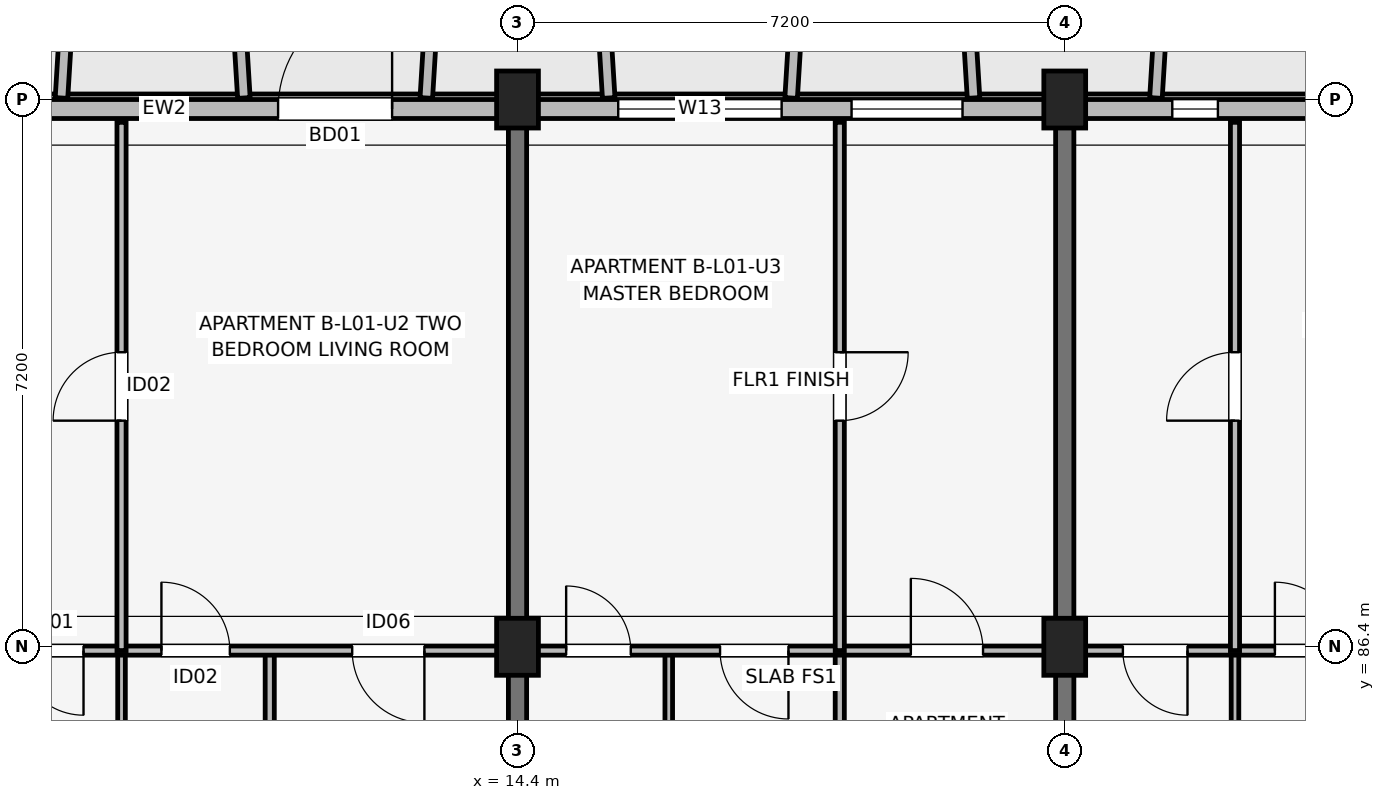
"""IFC4 building model, lengths in metres.
Left out: names, types, materials, properties, quantities, classifications, styles, units other than length and angle.
Written with IfcOpenShell. Run it as: python <this file> out.ifc"""

import sys

from ifc_helpers import new_model, si_unit, direction, frame, frame_2d, origin, origin_2d, place, context, subcontext, project, spatial, rectangle, extrude, element, fill, save


model = new_model("IFC4")
c1 = context("Model", 3, precision=1e-05, world=origin(), true_north=direction((0.0, 1.0)))
c2 = subcontext(c1, "Body", "Model", "MODEL_VIEW")
j1 = project(units=[si_unit("LENGTHUNIT", "METRE"), si_unit("PLANEANGLEUNIT", "RADIAN")], contexts=[c1])
p1 = place(None, origin())
s1 = spatial("IfcSite", under=j1, at=p1, CompositionType="ELEMENT")
p2 = place(p1, origin())
s2 = spatial("IfcBuilding", under=s1, at=p2, CompositionType="ELEMENT")
p3 = place(p2, frame((0.0, 0.0, 4.5)))
s3 = spatial("IfcBuildingStorey", under=s2, at=p3, CompositionType="ELEMENT", Elevation=4.5)
for number, where, z_axis, x_axis in (
    (1, (14.4, 86.4, 0.0), (0.0, 0.0, 1.0), (1.0, 0.0, 0.0)),
    (2, (14.4, 93.6, 0.0), (0.0, 0.0, 1.0), (1.0, 0.0, 0.0)),
    (3, (21.6, 86.4, 0.0), (0.0, 0.0, 1.0), (1.0, 0.0, 0.0)),
    (4, (21.6, 93.6, 0.0), (0.0, 0.0, 1.0), (1.0, 0.0, 0.0)),
):
    element("IfcColumn", number, at=place(p3, frame(where, z_axis=z_axis, x_axis=x_axis)), inside=s3, PredefinedType="COLUMN", context=c2, shape_type="SweptSolid", body=[
        extrude(rectangle(XDim=0.55, YDim=0.75, at=origin_2d()), origin(), (0.0, 0.0, 1.0), 4.2),
    ])
for number, where, z_axis, x_axis in (
    (5, (14.4, 83.85, 0.0), (0.0, 0.0, 1.0), (0.0, 1.0, 0.0)),
    (6, (21.6, 83.85, 0.0), (0.0, 0.0, 1.0), (0.0, 1.0, 0.0)),
):
    element("IfcWall", number, at=place(p3, frame(where, z_axis=z_axis, x_axis=x_axis)), inside=s3, PredefinedType="SHEAR", context=c2, shape_type="SweptSolid", body=[
        extrude(rectangle(XDim=9.4, YDim=0.24, at=frame_2d((4.7, 0.0))), origin(), (0.0, 0.0, 1.0), 4.2),
    ])
p4 = place(p3, frame((32.8, 93.475, 0.0), z_axis=(0.0, 0.0, 1.0), x_axis=(-1.0, 0.0, 0.0)))
e7 = element("IfcWall", 7, at=p4, inside=s3, PredefinedType="SOLIDWALL", context=c2, shape_type="SweptSolid", body=[
    extrude(rectangle(XDim=29.6, YDim=0.25, at=frame_2d((14.8, 0.0))), origin(), (0.0, 0.0, 1.0), 3.48),
])
p5 = place(p4, frame((21.55, 0.0, 0.0), z_axis=(0.0, 0.0, 1.0), x_axis=(-1.0, 0.0, 0.0)))
e8 = element("IfcOpeningElement", 8, at=p5, cuts=e7, PredefinedType="OPENING", context=c2, shape_type="SweptSolid", body=[
    extrude(rectangle(XDim=1.5, YDim=2.15, at=frame_2d((0.75, 1.075))), frame((0.0, 0.135, 0.0), z_axis=(0.0, -1.0, 0.0), x_axis=(1.0, 0.0, 0.0)), (0.0, 0.0, 1.0), 0.27),
])
p6 = place(p4, frame((7.3, 0.0, 0.0), z_axis=(0.0, 0.0, 1.0), x_axis=(-1.0, 0.0, 0.0)))
e9 = element("IfcOpeningElement", 9, at=p6, cuts=e7, PredefinedType="OPENING", context=c2, shape_type="SweptSolid", body=[
    extrude(rectangle(XDim=1.8, YDim=2.15, at=frame_2d((0.9, 1.075))), frame((0.0, 0.135, 0.0), z_axis=(0.0, -1.0, 0.0), x_axis=(1.0, 0.0, 0.0)), (0.0, 0.0, 1.0), 0.27),
])
p7 = place(p4, frame((27.57, 0.0, 0.7)))
e10 = element("IfcOpeningElement", 10, at=p7, cuts=e7, PredefinedType="OPENING", context=c2, shape_type="SweptSolid", body=[
    extrude(rectangle(XDim=1.46, YDim=1.55, at=frame_2d((0.73, 0.775))), frame((0.0, 0.135, 0.0), z_axis=(0.0, -1.0, 0.0), x_axis=(1.0, 0.0, 0.0)), (0.0, 0.0, 1.0), 0.27),
])
p8 = place(p4, frame((26.058, 0.0, 0.75)))
e11 = element("IfcOpeningElement", 11, at=p8, cuts=e7, PredefinedType="OPENING", context=c2, shape_type="SweptSolid", body=[
    extrude(rectangle(XDim=0.6, YDim=1.25, at=frame_2d((0.3, 0.625))), frame((0.0, 0.135, 0.0), z_axis=(0.0, -1.0, 0.0), x_axis=(1.0, 0.0, 0.0)), (0.0, 0.0, 1.0), 0.27),
])
p9 = place(p4, frame((24.542, 0.0, 0.75)))
e12 = element("IfcOpeningElement", 12, at=p9, cuts=e7, PredefinedType="OPENING", context=c2, shape_type="SweptSolid", body=[
    extrude(rectangle(XDim=0.6, YDim=1.25, at=frame_2d((0.3, 0.625))), frame((0.0, 0.135, 0.0), z_axis=(0.0, -1.0, 0.0), x_axis=(1.0, 0.0, 0.0)), (0.0, 0.0, 1.0), 0.27),
])
p10 = place(p4, frame((14.925, 0.0, 0.7)))
e13 = element("IfcOpeningElement", 13, at=p10, cuts=e7, PredefinedType="OPENING", context=c2, shape_type="SweptSolid", body=[
    extrude(rectangle(XDim=2.15, YDim=1.65, at=frame_2d((1.075, 0.825))), frame((0.0, 0.135, 0.0), z_axis=(0.0, -1.0, 0.0), x_axis=(1.0, 0.0, 0.0)), (0.0, 0.0, 1.0), 0.27),
])
p11 = place(p4, frame((12.545, 0.0, 0.75)))
e14 = element("IfcOpeningElement", 14, at=p11, cuts=e7, PredefinedType="OPENING", context=c2, shape_type="SweptSolid", body=[
    extrude(rectangle(XDim=1.46, YDim=1.55, at=frame_2d((0.73, 0.775))), frame((0.0, 0.135, 0.0), z_axis=(0.0, -1.0, 0.0), x_axis=(1.0, 0.0, 0.0)), (0.0, 0.0, 1.0), 0.27),
])
p12 = place(p4, frame((9.185, 0.0, 0.75)))
e15 = element("IfcOpeningElement", 15, at=p12, cuts=e7, PredefinedType="OPENING", context=c2, shape_type="SweptSolid", body=[
    extrude(rectangle(XDim=0.6, YDim=1.25, at=frame_2d((0.3, 0.625))), frame((0.0, 0.135, 0.0), z_axis=(0.0, -1.0, 0.0), x_axis=(1.0, 0.0, 0.0)), (0.0, 0.0, 1.0), 0.27),
])
p13 = place(p4, frame((2.942, 0.0, 0.75)))
e16 = element("IfcOpeningElement", 16, at=p13, cuts=e7, PredefinedType="OPENING", context=c2, shape_type="SweptSolid", body=[
    extrude(rectangle(XDim=0.6, YDim=1.25, at=frame_2d((0.3, 0.625))), frame((0.0, 0.135, 0.0), z_axis=(0.0, -1.0, 0.0), x_axis=(1.0, 0.0, 0.0)), (0.0, 0.0, 1.0), 0.27),
])
p14 = place(p4, frame((0.745, 0.0, 0.75)))
e17 = element("IfcOpeningElement", 17, at=p14, cuts=e7, PredefinedType="OPENING", context=c2, shape_type="SweptSolid", body=[
    extrude(rectangle(XDim=0.85, YDim=1.4, at=frame_2d((0.425, 0.7))), frame((0.0, 0.135, 0.0), z_axis=(0.0, -1.0, 0.0), x_axis=(1.0, 0.0, 0.0)), (0.0, 0.0, 1.0), 0.27),
])
for number, where, z_axis, x_axis in (
    (18, (8.4, 93.62, 0.0), (0.0, 0.0, 1.0), (0.061, 0.998, 0.0)),
    (19, (10.8, 93.62, 0.0), (0.0, 0.0, 1.0), (-0.061, 0.998, 0.0)),
    (20, (13.2, 93.62, 0.0), (0.0, 0.0, 1.0), (0.061, 0.998, 0.0)),
):
    element("IfcWall", number, at=place(p3, frame(where, z_axis=z_axis, x_axis=x_axis)), inside=s3, PredefinedType="ELEMENTEDWALL", context=c2, shape_type="SweptSolid", body=[
        extrude(rectangle(XDim=1.964, YDim=0.165, at=frame_2d((0.982, 0.0))), origin(), (0.0, 0.0, 1.0), 3.58),
    ])
for number, where, z_axis, x_axis in (
    (21, (15.6, 93.62, 0.0), (0.0, 0.0, 1.0), (-0.061, 0.998, 0.0)),
    (22, (18.0, 93.62, 0.0), (0.0, 0.0, 1.0), (0.061, 0.998, 0.0)),
    (23, (20.4, 93.62, 0.0), (0.0, 0.0, 1.0), (-0.061, 0.998, 0.0)),
):
    element("IfcWall", number, at=place(p3, frame(where, z_axis=z_axis, x_axis=x_axis)), inside=s3, PredefinedType="ELEMENTEDWALL", context=c2, shape_type="SweptSolid", body=[
        extrude(rectangle(XDim=1.964, YDim=0.165, at=frame_2d((0.982, 0.0))), origin(), (0.0, 0.0, 1.0), 3.6),
    ])
p15 = place(p3, frame((22.8, 93.62, 0.0), z_axis=(0.0, 0.0, 1.0), x_axis=(0.061046865508, 0.998134900808, 0.0)))
e24 = element("IfcWall", 24, at=p15, inside=s3, PredefinedType="ELEMENTEDWALL", context=c2, shape_type="SweptSolid", body=[
    extrude(rectangle(XDim=1.964, YDim=0.165, at=frame_2d((0.982, 0.0))), origin(), (0.0, 0.0, 1.0), 3.63),
])
p16 = place(p3, frame((9.19, 83.7, 0.0), z_axis=(0.0, 0.0, 1.0), x_axis=(0.0, 1.0, 0.0)))
e25 = element("IfcWall", 25, at=p16, inside=s3, PredefinedType="PARTITIONING", context=c2, shape_type="SweptSolid", body=[
    extrude(rectangle(XDim=2.65, YDim=0.1, at=frame_2d((1.325, 0.0))), origin(), (0.0, 0.0, 1.0), 3.25),
])
p17 = place(p3, frame((11.14, 83.7, 0.0), z_axis=(0.0, 0.0, 1.0), x_axis=(0.0, 1.0, 0.0)))
e26 = element("IfcWall", 26, at=p17, inside=s3, PredefinedType="PARTITIONING", context=c2, shape_type="SweptSolid", body=[
    extrude(rectangle(XDim=2.65, YDim=0.12, at=frame_2d((1.325, 0.0))), origin(), (0.0, 0.0, 1.0), 3.25),
])
p18 = place(p3, frame((7.34, 86.35, 0.0), z_axis=(0.0, 0.0, 1.0), x_axis=(1.0, 0.0, 0.0)))
e27 = element("IfcWall", 27, at=p18, inside=s3, PredefinedType="PARTITIONING", context=c2, shape_type="SweptSolid", body=[
    extrude(rectangle(XDim=6.92, YDim=0.12, at=frame_2d((3.46, 0.0))), origin(), (0.0, 0.0, 1.0), 3.25),
])
p19 = place(p18, frame((1.35, 0.0, 0.0), z_axis=(0.0, 0.0, 1.0), x_axis=(-1.0, 0.0, 0.0)))
e28 = element("IfcOpeningElement", 28, at=p19, cuts=e27, PredefinedType="OPENING", context=c2, shape_type="SweptSolid", body=[
    extrude(rectangle(XDim=0.85, YDim=2.08, at=frame_2d((0.425, 1.04))), frame((0.0, 0.07, 0.0), z_axis=(0.0, -1.0, 0.0), x_axis=(1.0, 0.0, 0.0)), (0.0, 0.0, 1.0), 0.14),
])
p20 = place(p18, frame((2.375, 0.0, 0.0)))
e29 = element("IfcOpeningElement", 29, at=p20, cuts=e27, PredefinedType="OPENING", context=c2, shape_type="SweptSolid", body=[
    extrude(rectangle(XDim=0.9, YDim=2.08, at=frame_2d((0.45, 1.04))), frame((0.0, 0.07, 0.0), z_axis=(0.0, -1.0, 0.0), x_axis=(1.0, 0.0, 0.0)), (0.0, 0.0, 1.0), 0.14),
])
p21 = place(p18, frame((5.835, 0.0, 0.0), z_axis=(0.0, 0.0, 1.0), x_axis=(-1.0, 0.0, 0.0)))
e30 = element("IfcOpeningElement", 30, at=p21, cuts=e27, PredefinedType="OPENING", context=c2, shape_type="SweptSolid", body=[
    extrude(rectangle(XDim=0.95, YDim=2.08, at=frame_2d((0.475, 1.04))), frame((0.0, 0.07, 0.0), z_axis=(0.0, -1.0, 0.0), x_axis=(1.0, 0.0, 0.0)), (0.0, 0.0, 1.0), 0.14),
])
p22 = place(p3, frame((9.19, 86.35, 0.0), z_axis=(0.0, 0.0, 1.0), x_axis=(0.0, 1.0, 0.0)))
e31 = element("IfcWall", 31, at=p22, inside=s3, PredefinedType="PARTITIONING", context=c2, shape_type="SweptSolid", body=[
    extrude(rectangle(XDim=6.95, YDim=0.12, at=frame_2d((3.475, 0.0))), origin(), (0.0, 0.0, 1.0), 3.25),
])
p23 = place(p22, frame((3.025, 0.0, 0.0)))
e32 = element("IfcOpeningElement", 32, at=p23, cuts=e31, PredefinedType="OPENING", context=c2, shape_type="SweptSolid", body=[
    extrude(rectangle(XDim=0.9, YDim=2.08, at=frame_2d((0.45, 1.04))), frame((0.0, 0.07, 0.0), z_axis=(0.0, -1.0, 0.0), x_axis=(1.0, 0.0, 0.0)), (0.0, 0.0, 1.0), 0.14),
])
p24 = place(p3, frame((16.39, 83.7, 0.0), z_axis=(0.0, 0.0, 1.0), x_axis=(0.0, 1.0, 0.0)))
e33 = element("IfcWall", 33, at=p24, inside=s3, PredefinedType="PARTITIONING", context=c2, shape_type="SweptSolid", body=[
    extrude(rectangle(XDim=2.65, YDim=0.1, at=frame_2d((1.325, 0.0))), origin(), (0.0, 0.0, 1.0), 3.25),
])
p25 = place(p3, frame((18.64, 83.7, 0.0), z_axis=(0.0, 0.0, 1.0), x_axis=(0.0, 1.0, 0.0)))
e34 = element("IfcWall", 34, at=p25, inside=s3, PredefinedType="PARTITIONING", context=c2, shape_type="SweptSolid", body=[
    extrude(rectangle(XDim=2.65, YDim=0.12, at=frame_2d((1.325, 0.0))), origin(), (0.0, 0.0, 1.0), 3.25),
])
p26 = place(p3, frame((14.54, 86.35, 0.0), z_axis=(0.0, 0.0, 1.0), x_axis=(1.0, 0.0, 0.0)))
e35 = element("IfcWall", 35, at=p26, inside=s3, PredefinedType="PARTITIONING", context=c2, shape_type="SweptSolid", body=[
    extrude(rectangle(XDim=6.92, YDim=0.12, at=frame_2d((3.46, 0.0))), origin(), (0.0, 0.0, 1.0), 3.25),
])
p27 = place(p26, frame((0.5, 0.0, 0.0)))
e36 = element("IfcOpeningElement", 36, at=p27, cuts=e35, PredefinedType="OPENING", context=c2, shape_type="SweptSolid", body=[
    extrude(rectangle(XDim=0.85, YDim=2.08, at=frame_2d((0.425, 1.04))), frame((0.0, 0.07, 0.0), z_axis=(0.0, -1.0, 0.0), x_axis=(1.0, 0.0, 0.0)), (0.0, 0.0, 1.0), 0.14),
])
p28 = place(p26, frame((3.425, 0.0, 0.0), z_axis=(0.0, 0.0, 1.0), x_axis=(-1.0, 0.0, 0.0)))
e37 = element("IfcOpeningElement", 37, at=p28, cuts=e35, PredefinedType="OPENING", context=c2, shape_type="SweptSolid", body=[
    extrude(rectangle(XDim=0.9, YDim=2.08, at=frame_2d((0.45, 1.04))), frame((0.0, 0.07, 0.0), z_axis=(0.0, -1.0, 0.0), x_axis=(1.0, 0.0, 0.0)), (0.0, 0.0, 1.0), 0.14),
])
p29 = place(p26, frame((5.035, 0.0, 0.0)))
e38 = element("IfcOpeningElement", 38, at=p29, cuts=e35, PredefinedType="OPENING", context=c2, shape_type="SweptSolid", body=[
    extrude(rectangle(XDim=0.95, YDim=2.08, at=frame_2d((0.475, 1.04))), frame((0.0, 0.07, 0.0), z_axis=(0.0, -1.0, 0.0), x_axis=(1.0, 0.0, 0.0)), (0.0, 0.0, 1.0), 0.14),
])
p30 = place(p3, frame((18.64, 86.35, 0.0), z_axis=(0.0, 0.0, 1.0), x_axis=(0.0, 1.0, 0.0)))
e39 = element("IfcWall", 39, at=p30, inside=s3, PredefinedType="PARTITIONING", context=c2, shape_type="SweptSolid", body=[
    extrude(rectangle(XDim=6.95, YDim=0.12, at=frame_2d((3.475, 0.0))), origin(), (0.0, 0.0, 1.0), 3.25),
])
p31 = place(p30, frame((3.925, 0.0, 0.0), z_axis=(0.0, 0.0, 1.0), x_axis=(-1.0, 0.0, 0.0)))
e40 = element("IfcOpeningElement", 40, at=p31, cuts=e39, PredefinedType="OPENING", context=c2, shape_type="SweptSolid", body=[
    extrude(rectangle(XDim=0.9, YDim=2.08, at=frame_2d((0.45, 1.04))), frame((0.0, 0.07, 0.0), z_axis=(0.0, -1.0, 0.0), x_axis=(1.0, 0.0, 0.0)), (0.0, 0.0, 1.0), 0.14),
])
p32 = place(p3, frame((23.84, 83.7, 0.0), z_axis=(0.0, 0.0, 1.0), x_axis=(0.0, 1.0, 0.0)))
e41 = element("IfcWall", 41, at=p32, inside=s3, PredefinedType="PARTITIONING", context=c2, shape_type="SweptSolid", body=[
    extrude(rectangle(XDim=2.65, YDim=0.1, at=frame_2d((1.325, 0.0))), origin(), (0.0, 0.0, 1.0), 3.25),
])
p33 = place(p3, frame((21.74, 86.35, 0.0), z_axis=(0.0, 0.0, 1.0), x_axis=(1.0, 0.0, 0.0)))
e42 = element("IfcWall", 42, at=p33, inside=s3, PredefinedType="PARTITIONING", context=c2, shape_type="SweptSolid", body=[
    extrude(rectangle(XDim=6.92, YDim=0.12, at=frame_2d((3.46, 0.0))), origin(), (0.0, 0.0, 1.0), 3.25),
])
p34 = place(p33, frame((1.475, 0.0, 0.0), z_axis=(0.0, 0.0, 1.0), x_axis=(-1.0, 0.0, 0.0)))
e43 = element("IfcOpeningElement", 43, at=p34, cuts=e42, PredefinedType="OPENING", context=c2, shape_type="SweptSolid", body=[
    extrude(rectangle(XDim=0.85, YDim=2.08, at=frame_2d((0.425, 1.04))), frame((0.0, 0.07, 0.0), z_axis=(0.0, -1.0, 0.0), x_axis=(1.0, 0.0, 0.0)), (0.0, 0.0, 1.0), 0.14),
])
p35 = place(p33, frame((2.625, 0.0, 0.0)))
e44 = element("IfcOpeningElement", 44, at=p35, cuts=e42, PredefinedType="OPENING", context=c2, shape_type="SweptSolid", body=[
    extrude(rectangle(XDim=0.9, YDim=2.08, at=frame_2d((0.45, 1.04))), frame((0.0, 0.07, 0.0), z_axis=(0.0, -1.0, 0.0), x_axis=(1.0, 0.0, 0.0)), (0.0, 0.0, 1.0), 0.14),
])
p36 = place(p33, frame((5.96, 0.0, 0.0), z_axis=(0.0, 0.0, 1.0), x_axis=(-1.0, 0.0, 0.0)))
e45 = element("IfcOpeningElement", 45, at=p36, cuts=e42, PredefinedType="OPENING", context=c2, shape_type="SweptSolid", body=[
    extrude(rectangle(XDim=0.95, YDim=2.08, at=frame_2d((0.475, 1.04))), frame((0.0, 0.07, 0.0), z_axis=(0.0, -1.0, 0.0), x_axis=(1.0, 0.0, 0.0)), (0.0, 0.0, 1.0), 0.14),
])
p37 = place(p3, frame((23.84, 86.35, 0.0), z_axis=(0.0, 0.0, 1.0), x_axis=(0.0, 1.0, 0.0)))
e46 = element("IfcWall", 46, at=p37, inside=s3, PredefinedType="PARTITIONING", context=c2, shape_type="SweptSolid", body=[
    extrude(rectangle(XDim=6.95, YDim=0.12, at=frame_2d((3.475, 0.0))), origin(), (0.0, 0.0, 1.0), 3.25),
])
p38 = place(p37, frame((3.025, 0.0, 0.0)))
e47 = element("IfcOpeningElement", 47, at=p38, cuts=e46, PredefinedType="OPENING", context=c2, shape_type="SweptSolid", body=[
    extrude(rectangle(XDim=0.9, YDim=2.08, at=frame_2d((0.45, 1.04))), frame((0.0, 0.07, 0.0), z_axis=(0.0, -1.0, 0.0), x_axis=(1.0, 0.0, 0.0)), (0.0, 0.0, 1.0), 0.14),
])
p39 = place(p5, origin())
e48 = element("IfcDoor", 48, at=p39, inside=s3, OperationType="SINGLE_SWING_LEFT", PredefinedType="DOOR", context=c2, shape_type="SweptSolid", body=[
    extrude(rectangle(XDim=1.5, YDim=2.15, at=frame_2d((0.75, 1.075))), frame((0.0, 0.025, 0.0), z_axis=(0.0, -1.0, 0.0), x_axis=(1.0, 0.0, 0.0)), (0.0, 0.0, 1.0), 0.05),
])
fill(e8, e48)
p40 = place(p10, origin())
e49 = element("IfcWindow", 49, at=p40, inside=s3, PartitioningType="SINGLE_PANEL", PredefinedType="WINDOW", context=c2, shape_type="SweptSolid", body=[
    extrude(rectangle(XDim=2.15, YDim=1.65, at=frame_2d((1.075, 0.825))), frame((0.0, 0.03, 0.0), z_axis=(0.0, -1.0, 0.0), x_axis=(1.0, 0.0, 0.0)), (0.0, 0.0, 1.0), 0.06),
])
fill(e13, e49)
p41 = place(p11, origin())
e50 = element("IfcWindow", 50, at=p41, inside=s3, PartitioningType="SINGLE_PANEL", PredefinedType="WINDOW", context=c2, shape_type="SweptSolid", body=[
    extrude(rectangle(XDim=1.46, YDim=1.55, at=frame_2d((0.73, 0.775))), frame((0.0, 0.03, 0.0), z_axis=(0.0, -1.0, 0.0), x_axis=(1.0, 0.0, 0.0)), (0.0, 0.0, 1.0), 0.06),
])
fill(e14, e50)
p42 = place(p12, origin())
e51 = element("IfcWindow", 51, at=p42, inside=s3, PartitioningType="SINGLE_PANEL", PredefinedType="WINDOW", context=c2, shape_type="SweptSolid", body=[
    extrude(rectangle(XDim=0.6, YDim=1.25, at=frame_2d((0.3, 0.625))), frame((0.0, 0.03, 0.0), z_axis=(0.0, -1.0, 0.0), x_axis=(1.0, 0.0, 0.0)), (0.0, 0.0, 1.0), 0.06),
])
fill(e15, e51)
p43 = place(p19, origin())
e52 = element("IfcDoor", 52, at=p43, inside=s3, OperationType="SINGLE_SWING_RIGHT", PredefinedType="DOOR", context=c2, shape_type="SweptSolid", body=[
    extrude(rectangle(XDim=0.85, YDim=2.08, at=frame_2d((0.425, 1.04))), frame((0.0, 0.025, 0.0), z_axis=(0.0, -1.0, 0.0), x_axis=(1.0, 0.0, 0.0)), (0.0, 0.0, 1.0), 0.05),
])
fill(e28, e52)
p44 = place(p20, origin())
e53 = element("IfcDoor", 53, at=p44, inside=s3, OperationType="SINGLE_SWING_LEFT", PredefinedType="DOOR", context=c2, shape_type="SweptSolid", body=[
    extrude(rectangle(XDim=0.9, YDim=2.08, at=frame_2d((0.45, 1.04))), frame((0.0, 0.025, 0.0), z_axis=(0.0, -1.0, 0.0), x_axis=(1.0, 0.0, 0.0)), (0.0, 0.0, 1.0), 0.05),
])
fill(e29, e53)
p45 = place(p21, origin())
e54 = element("IfcDoor", 54, at=p45, inside=s3, OperationType="SINGLE_SWING_RIGHT", PredefinedType="DOOR", context=c2, shape_type="SweptSolid", body=[
    extrude(rectangle(XDim=0.95, YDim=2.08, at=frame_2d((0.475, 1.04))), frame((0.0, 0.025, 0.0), z_axis=(0.0, -1.0, 0.0), x_axis=(1.0, 0.0, 0.0)), (0.0, 0.0, 1.0), 0.05),
])
fill(e30, e54)
p46 = place(p23, origin())
e55 = element("IfcDoor", 55, at=p46, inside=s3, OperationType="SINGLE_SWING_LEFT", PredefinedType="DOOR", context=c2, shape_type="SweptSolid", body=[
    extrude(rectangle(XDim=0.9, YDim=2.08, at=frame_2d((0.45, 1.04))), frame((0.0, 0.025, 0.0), z_axis=(0.0, -1.0, 0.0), x_axis=(1.0, 0.0, 0.0)), (0.0, 0.0, 1.0), 0.05),
])
fill(e32, e55)
p47 = place(p27, origin())
e56 = element("IfcDoor", 56, at=p47, inside=s3, OperationType="SINGLE_SWING_LEFT", PredefinedType="DOOR", context=c2, shape_type="SweptSolid", body=[
    extrude(rectangle(XDim=0.85, YDim=2.08, at=frame_2d((0.425, 1.04))), frame((0.0, 0.025, 0.0), z_axis=(0.0, -1.0, 0.0), x_axis=(1.0, 0.0, 0.0)), (0.0, 0.0, 1.0), 0.05),
])
fill(e36, e56)
p48 = place(p28, origin())
e57 = element("IfcDoor", 57, at=p48, inside=s3, OperationType="SINGLE_SWING_RIGHT", PredefinedType="DOOR", context=c2, shape_type="SweptSolid", body=[
    extrude(rectangle(XDim=0.9, YDim=2.08, at=frame_2d((0.45, 1.04))), frame((0.0, 0.025, 0.0), z_axis=(0.0, -1.0, 0.0), x_axis=(1.0, 0.0, 0.0)), (0.0, 0.0, 1.0), 0.05),
])
fill(e37, e57)
p49 = place(p29, origin())
e58 = element("IfcDoor", 58, at=p49, inside=s3, OperationType="SINGLE_SWING_LEFT", PredefinedType="DOOR", context=c2, shape_type="SweptSolid", body=[
    extrude(rectangle(XDim=0.95, YDim=2.08, at=frame_2d((0.475, 1.04))), frame((0.0, 0.025, 0.0), z_axis=(0.0, -1.0, 0.0), x_axis=(1.0, 0.0, 0.0)), (0.0, 0.0, 1.0), 0.05),
])
fill(e38, e58)
p50 = place(p31, origin())
e59 = element("IfcDoor", 59, at=p50, inside=s3, OperationType="SINGLE_SWING_RIGHT", PredefinedType="DOOR", context=c2, shape_type="SweptSolid", body=[
    extrude(rectangle(XDim=0.9, YDim=2.08, at=frame_2d((0.45, 1.04))), frame((0.0, 0.025, 0.0), z_axis=(0.0, -1.0, 0.0), x_axis=(1.0, 0.0, 0.0)), (0.0, 0.0, 1.0), 0.05),
])
fill(e40, e59)
p51 = place(p34, origin())
e60 = element("IfcDoor", 60, at=p51, inside=s3, OperationType="SINGLE_SWING_RIGHT", PredefinedType="DOOR", context=c2, shape_type="SweptSolid", body=[
    extrude(rectangle(XDim=0.85, YDim=2.08, at=frame_2d((0.425, 1.04))), frame((0.0, 0.025, 0.0), z_axis=(0.0, -1.0, 0.0), x_axis=(1.0, 0.0, 0.0)), (0.0, 0.0, 1.0), 0.05),
])
fill(e43, e60)
p52 = place(p35, origin())
e61 = element("IfcDoor", 61, at=p52, inside=s3, OperationType="SINGLE_SWING_LEFT", PredefinedType="DOOR", context=c2, shape_type="SweptSolid", body=[
    extrude(rectangle(XDim=0.9, YDim=2.08, at=frame_2d((0.45, 1.04))), frame((0.0, 0.025, 0.0), z_axis=(0.0, -1.0, 0.0), x_axis=(1.0, 0.0, 0.0)), (0.0, 0.0, 1.0), 0.05),
])
fill(e44, e61)
p53 = place(p38, origin())
e62 = element("IfcDoor", 62, at=p53, inside=s3, OperationType="SINGLE_SWING_LEFT", PredefinedType="DOOR", context=c2, shape_type="SweptSolid", body=[
    extrude(rectangle(XDim=0.9, YDim=2.08, at=frame_2d((0.45, 1.04))), frame((0.0, 0.025, 0.0), z_axis=(0.0, -1.0, 0.0), x_axis=(1.0, 0.0, 0.0)), (0.0, 0.0, 1.0), 0.05),
])
fill(e47, e62)
save(model, sys.argv[1])
